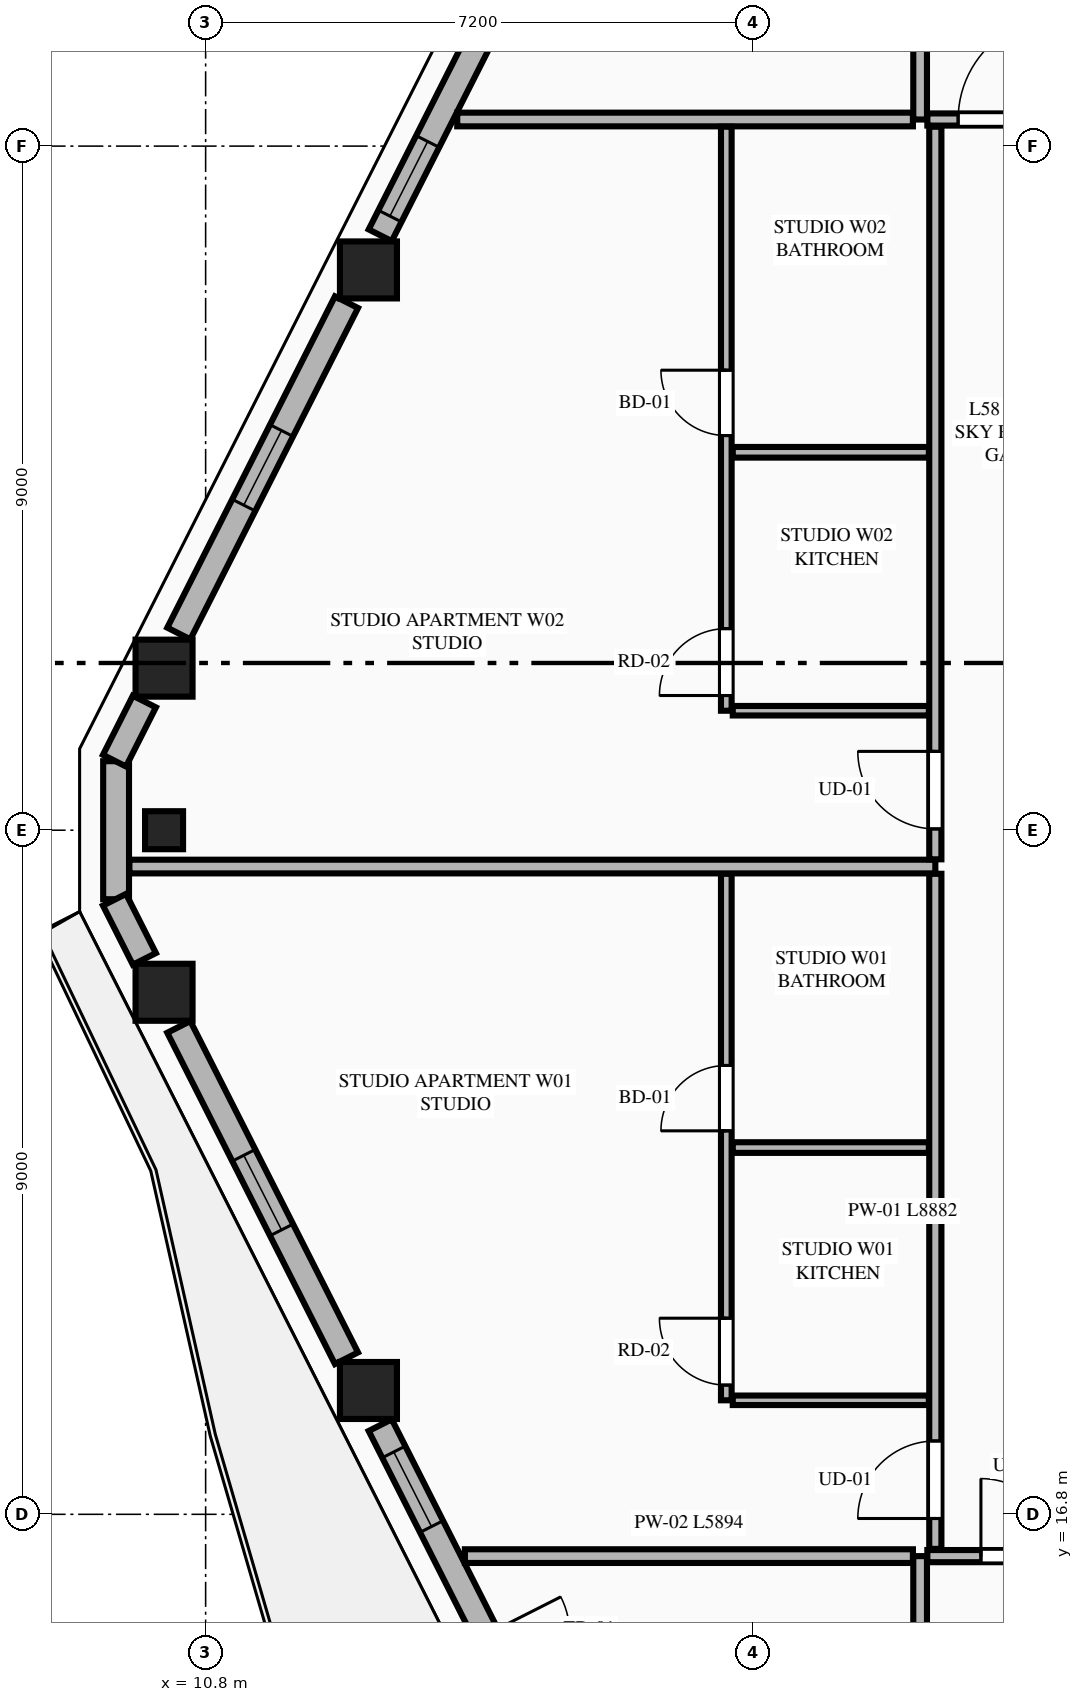
"""IFC4 building model, lengths in metres.
Left out: names, types, materials, properties, quantities, classifications, styles, units other than length and angle.
Written with IfcOpenShell. Run it as: python <this file> out.ifc"""

import sys

from ifc_helpers import new_model, si_unit, direction, frame, frame_2d, origin, origin_2d, place, context, subcontext, project, spatial, rectangle, extrude, element, fill, save


model = new_model("IFC4")
c1 = context("Model", 3, precision=1e-05, world=origin(), true_north=direction((0.0, 1.0)))
c2 = subcontext(c1, "Body", "Model", "MODEL_VIEW")
j1 = project(units=[si_unit("LENGTHUNIT", "METRE"), si_unit("PLANEANGLEUNIT", "RADIAN")], contexts=[c1])
p1 = place(None, origin())
s1 = spatial("IfcSite", under=j1, at=p1, CompositionType="ELEMENT")
p2 = place(p1, origin())
s2 = spatial("IfcBuilding", under=s1, at=p2, CompositionType="ELEMENT")
p3 = place(p2, frame((0.0, 0.0, 218.05)))
s3 = spatial("IfcBuildingStorey", under=s2, at=p3, CompositionType="ELEMENT", Elevation=218.05)
for number, where, z_axis, x_axis in (
    (1, (12.942, 33.171, 0.0), (0.0, 0.0, 1.0), (1.0, 0.0, 0.0)),
    (2, (10.253, 27.932, 0.0), (0.0, 0.0, 1.0), (1.0, 0.0, 0.0)),
    (3, (10.253, 23.668, 0.0), (0.0, 0.0, 1.0), (1.0, 0.0, 0.0)),
    (4, (12.942, 18.429, 0.0), (0.0, 0.0, 1.0), (1.0, 0.0, 0.0)),
):
    element("IfcColumn", number, at=place(p3, frame(where, z_axis=z_axis, x_axis=x_axis)), inside=s3, PredefinedType="COLUMN", context=c2, shape_type="SweptSolid", body=[
        extrude(rectangle(XDim=0.75, YDim=0.75, at=origin_2d()), origin(), (0.0, 0.0, 1.0), 3.55),
    ])
p4 = place(p3, frame((10.253, 25.8, 0.0), z_axis=(0.0, 0.0, 1.0), x_axis=(0.0, -1.0, 0.0)))
e5 = element("IfcColumn", 5, at=p4, inside=s3, PredefinedType="PILASTER", context=c2, shape_type="SweptSolid", body=[
    extrude(rectangle(XDim=0.5, YDim=0.35, at=origin_2d()), origin(), (0.0, 0.0, 1.0), 3.55),
])
p5 = place(p3, frame((9.622, 26.708, 0.0), z_axis=(0.0, 0.0, 1.0), x_axis=(0.0, -1.0, 0.0)))
e6 = element("IfcWall", 6, at=p5, inside=s3, PredefinedType="STANDARD", context=c2, shape_type="SweptSolid", body=[
    extrude(rectangle(XDim=1.816, YDim=0.34, at=frame_2d((0.908, 0.0))), origin(), (0.0, 0.0, 1.0), 3.27),
])
p6 = place(p3, frame((15.397, 38.173, 0.0), z_axis=(0.0, 0.0, 1.0), x_axis=(-0.451444616922, -0.892299141461, 0.0)))
e7 = element("IfcWall", 7, at=p6, inside=s3, PredefinedType="STANDARD", context=c2, shape_type="SweptSolid", body=[
    extrude(rectangle(XDim=5.095, YDim=0.34, at=frame_2d((2.547, 0.0))), origin(), (0.0, 0.0, 1.0), 2.803),
])
p7 = place(p6, frame((1.014, 0.0, 0.75)))
e8 = element("IfcOpeningElement", 8, at=p7, cuts=e7, PredefinedType="OPENING", context=c2, shape_type="SweptSolid", body=[
    extrude(rectangle(XDim=1.1, YDim=1.903, at=frame_2d((0.55, 0.952))), frame((0.0, 0.18, 0.0), z_axis=(0.0, -1.0, 0.0), x_axis=(1.0, 0.0, 0.0)), (0.0, 0.0, 1.0), 0.36),
])
p8 = place(p6, frame((3.712, 0.0, 0.75)))
e9 = element("IfcOpeningElement", 9, at=p8, cuts=e7, PredefinedType="OPENING", context=c2, shape_type="SweptSolid", body=[
    extrude(rectangle(XDim=1.1, YDim=1.903, at=frame_2d((0.55, 0.952))), frame((0.0, 0.18, 0.0), z_axis=(0.0, -1.0, 0.0), x_axis=(1.0, 0.0, 0.0)), (0.0, 0.0, 1.0), 0.36),
])
p9 = place(p3, frame((12.653, 32.747, 0.0), z_axis=(0.0, 0.0, 1.0), x_axis=(-0.451545895749, -0.892247893824, 0.0)))
e10 = element("IfcWall", 10, at=p9, inside=s3, PredefinedType="STANDARD", context=c2, shape_type="SweptSolid", body=[
    extrude(rectangle(XDim=4.885, YDim=0.34, at=frame_2d((2.443, 0.0))), origin(), (0.0, 0.0, 1.0), 2.803),
])
p10 = place(p9, frame((1.893, 0.0, 0.75)))
e11 = element("IfcOpeningElement", 11, at=p10, cuts=e10, PredefinedType="OPENING", context=c2, shape_type="SweptSolid", body=[
    extrude(rectangle(XDim=1.1, YDim=1.903, at=frame_2d((0.55, 0.952))), frame((0.0, 0.18, 0.0), z_axis=(0.0, -1.0, 0.0), x_axis=(1.0, 0.0, 0.0)), (0.0, 0.0, 1.0), 0.36),
])
p11 = place(p3, frame((9.994, 27.493, 0.0), z_axis=(0.0, 0.0, 1.0), x_axis=(-0.450796198004, -0.892626902947, 0.0)))
e12 = element("IfcWall", 12, at=p11, inside=s3, PredefinedType="STANDARD", context=c2, shape_type="SweptSolid", body=[
    extrude(rectangle(XDim=0.871, YDim=0.34, at=frame_2d((0.436, 0.0))), origin(), (0.0, 0.0, 1.0), 3.27),
])
p12 = place(p3, frame((9.601, 24.885, 0.0), z_axis=(0.0, 0.0, 1.0), x_axis=(0.450683483537, -0.892683817299, 0.0)))
e13 = element("IfcWall", 13, at=p12, inside=s3, PredefinedType="STANDARD", context=c2, shape_type="SweptSolid", body=[
    extrude(rectangle(XDim=0.872, YDim=0.34, at=frame_2d((0.436, 0.0))), origin(), (0.0, 0.0, 1.0), 3.27),
])
p13 = place(p3, frame((10.447, 23.212, 0.0), z_axis=(0.0, 0.0, 1.0), x_axis=(0.451566029745, -0.892237704191, 0.0)))
e14 = element("IfcWall", 14, at=p13, inside=s3, PredefinedType="STANDARD", context=c2, shape_type="SweptSolid", body=[
    extrude(rectangle(XDim=4.885, YDim=0.34, at=frame_2d((2.443, 0.0))), origin(), (0.0, 0.0, 1.0), 2.803),
])
p14 = place(p13, frame((1.893, 0.0, 0.75)))
e15 = element("IfcOpeningElement", 15, at=p14, cuts=e14, PredefinedType="OPENING", context=c2, shape_type="SweptSolid", body=[
    extrude(rectangle(XDim=1.1, YDim=1.903, at=frame_2d((0.55, 0.952))), frame((0.0, 0.18, 0.0), z_axis=(0.0, -1.0, 0.0), x_axis=(1.0, 0.0, 0.0)), (0.0, 0.0, 1.0), 0.36),
])
p15 = place(p3, frame((13.097, 17.973, 0.0), z_axis=(0.0, 0.0, 1.0), x_axis=(0.451463920536, -0.892289374841, 0.0)))
e16 = element("IfcWall", 16, at=p15, inside=s3, PredefinedType="STANDARD", context=c2, shape_type="SweptSolid", body=[
    extrude(rectangle(XDim=5.095, YDim=0.34, at=frame_2d((2.547, 0.0))), origin(), (0.0, 0.0, 1.0), 2.803),
])
p16 = place(p15, frame((3.088, 0.0, 0.0)))
e17 = element("IfcOpeningElement", 17, at=p16, cuts=e16, PredefinedType="OPENING", context=c2, shape_type="SweptSolid", body=[
    extrude(rectangle(XDim=1.1, YDim=2.25, at=frame_2d((0.55, 1.125))), frame((0.0, 0.18, 0.0), z_axis=(0.0, -1.0, 0.0), x_axis=(1.0, 0.0, 0.0)), (0.0, 0.0, 1.0), 0.36),
])
p17 = place(p15, frame((0.395, 0.0, 0.75)))
e18 = element("IfcOpeningElement", 18, at=p17, cuts=e16, PredefinedType="OPENING", context=c2, shape_type="SweptSolid", body=[
    extrude(rectangle(XDim=1.1, YDim=1.903, at=frame_2d((0.55, 0.952))), frame((0.0, 0.18, 0.0), z_axis=(0.0, -1.0, 0.0), x_axis=(1.0, 0.0, 0.0)), (0.0, 0.0, 1.0), 0.36),
])
p18 = place(p3, frame((20.2, 5.968, 0.0), z_axis=(0.0, 0.0, 1.0), x_axis=(0.0, 1.0, 0.0)))
e19 = element("IfcWall", 19, at=p18, inside=s3, PredefinedType="PARTITIONING", context=c2, shape_type="SweptSolid", body=[
    extrude(rectangle(XDim=10.282, YDim=0.18, at=frame_2d((5.141, 0.0))), origin(), (0.0, 0.0, 1.0), 3.27),
])
p19 = place(p3, frame((20.295, 16.25, 0.0), z_axis=(0.0, 0.0, 1.0), x_axis=(1.0, 0.0, 0.0)))
e20 = element("IfcWall", 20, at=p19, inside=s3, PredefinedType="PARTITIONING", context=c2, shape_type="SweptSolid", body=[
    extrude(rectangle(XDim=24.21, YDim=0.16, at=frame_2d((12.105, 0.0))), origin(), (0.0, 0.0, 1.0), 3.27),
])
p20 = place(p19, frame((0.705, 0.0, 0.0)))
e21 = element("IfcOpeningElement", 21, at=p20, cuts=e20, PredefinedType="OPENING", context=c2, shape_type="SweptSolid", body=[
    extrude(rectangle(XDim=1.02, YDim=2.25, at=frame_2d((0.51, 1.125))), frame((0.0, 0.09, 0.0), z_axis=(0.0, -1.0, 0.0), x_axis=(1.0, 0.0, 0.0)), (0.0, 0.0, 1.0), 0.18),
])
p21 = place(p3, frame((20.2, 35.15, 0.0), z_axis=(0.0, 0.0, 1.0), x_axis=(0.0, 1.0, 0.0)))
e22 = element("IfcWall", 22, at=p21, inside=s3, PredefinedType="PARTITIONING", context=c2, shape_type="SweptSolid", body=[
    extrude(rectangle(XDim=10.482, YDim=0.18, at=frame_2d((5.241, 0.0))), origin(), (0.0, 0.0, 1.0), 3.27),
])
p22 = place(p3, frame((20.295, 35.15, 0.0), z_axis=(0.0, 0.0, 1.0), x_axis=(1.0, 0.0, 0.0)))
e23 = element("IfcWall", 23, at=p22, inside=s3, PredefinedType="PARTITIONING", context=c2, shape_type="SweptSolid", body=[
    extrude(rectangle(XDim=24.21, YDim=0.16, at=frame_2d((12.105, 0.0))), origin(), (0.0, 0.0, 1.0), 3.27),
])
p23 = place(p22, frame((0.405, 0.0, 0.0)))
e24 = element("IfcOpeningElement", 24, at=p23, cuts=e23, PredefinedType="OPENING", context=c2, shape_type="SweptSolid", body=[
    extrude(rectangle(XDim=1.35, YDim=2.35, at=frame_2d((0.675, 1.175))), frame((0.0, 0.09, 0.0), z_axis=(0.0, -1.0, 0.0), x_axis=(1.0, 0.0, 0.0)), (0.0, 0.0, 1.0), 0.18),
])
p24 = place(p3, frame((14.211, 16.25, 0.0), z_axis=(0.0, 0.0, 1.0), x_axis=(1.0, 0.0, 0.0)))
e25 = element("IfcWall", 25, at=p24, inside=s3, PredefinedType="PARTITIONING", context=c2, shape_type="SweptSolid", body=[
    extrude(rectangle(XDim=5.894, YDim=0.18, at=frame_2d((2.947, 0.0))), origin(), (0.0, 0.0, 1.0), 3.27),
])
p25 = place(p3, frame((14.11, 35.15, 0.0), z_axis=(0.0, 0.0, 1.0), x_axis=(1.0, 0.0, 0.0)))
e26 = element("IfcWall", 26, at=p25, inside=s3, PredefinedType="PARTITIONING", context=c2, shape_type="SweptSolid", body=[
    extrude(rectangle(XDim=5.995, YDim=0.18, at=frame_2d((2.998, 0.0))), origin(), (0.0, 0.0, 1.0), 3.27),
])
p26 = place(p3, frame((20.4, 16.345, 0.0), z_axis=(0.0, 0.0, 1.0), x_axis=(0.0, 1.0, 0.0)))
e27 = element("IfcWall", 27, at=p26, inside=s3, PredefinedType="PARTITIONING", context=c2, shape_type="SweptSolid", body=[
    extrude(rectangle(XDim=8.882, YDim=0.16, at=frame_2d((4.441, 0.0))), origin(), (0.0, 0.0, 1.0), 3.27),
])
p27 = place(p26, frame((0.4, 0.0, 0.0)))
e28 = element("IfcOpeningElement", 28, at=p27, cuts=e27, PredefinedType="OPENING", context=c2, shape_type="SweptSolid", body=[
    extrude(rectangle(XDim=1.02, YDim=2.25, at=frame_2d((0.51, 1.125))), frame((0.0, 0.09, 0.0), z_axis=(0.0, -1.0, 0.0), x_axis=(1.0, 0.0, 0.0)), (0.0, 0.0, 1.0), 0.18),
])
p28 = place(p3, frame((17.735, 18.3, 0.0), z_axis=(0.0, 0.0, 1.0), x_axis=(1.0, 0.0, 0.0)))
e29 = element("IfcWall", 29, at=p28, inside=s3, PredefinedType="PARTITIONING", context=c2, shape_type="SweptSolid", body=[
    extrude(rectangle(XDim=2.58, YDim=0.125, at=frame_2d((1.29, 0.0))), origin(), (0.0, 0.0, 1.0), 2.727),
])
p29 = place(p3, frame((17.65, 18.3, 0.0), z_axis=(0.0, 0.0, 1.0), x_axis=(0.0, 1.0, 0.0)))
e30 = element("IfcWall", 30, at=p29, inside=s3, PredefinedType="PLUMBINGWALL", context=c2, shape_type="SweptSolid", body=[
    extrude(rectangle(XDim=6.927, YDim=0.14, at=frame_2d((3.463, 0.0))), origin(), (0.0, 0.0, 1.0), 3.27),
])
p30 = place(p29, frame((3.545, 0.0, 0.0)))
e31 = element("IfcOpeningElement", 31, at=p30, cuts=e30, PredefinedType="OPENING", context=c2, shape_type="SweptSolid", body=[
    extrude(rectangle(XDim=0.86, YDim=2.1, at=frame_2d((0.43, 1.05))), frame((0.0, 0.08, 0.0), z_axis=(0.0, -1.0, 0.0), x_axis=(1.0, 0.0, 0.0)), (0.0, 0.0, 1.0), 0.16),
])
p31 = place(p29, frame((0.2, 0.0, 0.0)))
e32 = element("IfcOpeningElement", 32, at=p31, cuts=e30, PredefinedType="OPENING", context=c2, shape_type="SweptSolid", body=[
    extrude(rectangle(XDim=0.88, YDim=2.15, at=frame_2d((0.44, 1.075))), frame((0.0, 0.08, 0.0), z_axis=(0.0, -1.0, 0.0), x_axis=(1.0, 0.0, 0.0)), (0.0, 0.0, 1.0), 0.16),
])
p32 = place(p3, frame((17.735, 21.625, 0.0), z_axis=(0.0, 0.0, 1.0), x_axis=(1.0, 0.0, 0.0)))
e33 = element("IfcWall", 33, at=p32, inside=s3, PredefinedType="PLUMBINGWALL", context=c2, shape_type="SweptSolid", body=[
    extrude(rectangle(XDim=2.58, YDim=0.14, at=frame_2d((1.29, 0.0))), origin(), (0.0, 0.0, 1.0), 3.27),
])
p33 = place(p3, frame((9.797, 25.322, 0.0), z_axis=(0.0, 0.0, 1.0), x_axis=(1.0, 0.0, 0.0)))
e34 = element("IfcWall", 34, at=p33, inside=s3, PredefinedType="PARTITIONING", context=c2, shape_type="SweptSolid", body=[
    extrude(rectangle(XDim=10.603, YDim=0.18, at=frame_2d((5.301, 0.0))), origin(), (0.0, 0.0, 1.0), 3.27),
])
p34 = place(p3, frame((20.4, 25.417, 0.0), z_axis=(0.0, 0.0, 1.0), x_axis=(0.0, 1.0, 0.0)))
e35 = element("IfcWall", 35, at=p34, inside=s3, PredefinedType="PARTITIONING", context=c2, shape_type="SweptSolid", body=[
    extrude(rectangle(XDim=9.638, YDim=0.16, at=frame_2d((4.819, 0.0))), origin(), (0.0, 0.0, 1.0), 3.27),
])
p35 = place(p34, frame((0.4, 0.0, 0.0)))
e36 = element("IfcOpeningElement", 36, at=p35, cuts=e35, PredefinedType="OPENING", context=c2, shape_type="SweptSolid", body=[
    extrude(rectangle(XDim=1.02, YDim=2.25, at=frame_2d((0.51, 1.125))), frame((0.0, 0.09, 0.0), z_axis=(0.0, -1.0, 0.0), x_axis=(1.0, 0.0, 0.0)), (0.0, 0.0, 1.0), 0.18),
])
p36 = place(p3, frame((17.735, 27.372, 0.0), z_axis=(0.0, 0.0, 1.0), x_axis=(1.0, 0.0, 0.0)))
e37 = element("IfcWall", 37, at=p36, inside=s3, PredefinedType="PARTITIONING", context=c2, shape_type="SweptSolid", body=[
    extrude(rectangle(XDim=2.58, YDim=0.125, at=frame_2d((1.29, 0.0))), origin(), (0.0, 0.0, 1.0), 3.27),
])
p37 = place(p3, frame((17.65, 27.372, 0.0), z_axis=(0.0, 0.0, 1.0), x_axis=(0.0, 1.0, 0.0)))
e38 = element("IfcWall", 38, at=p37, inside=s3, PredefinedType="PLUMBINGWALL", context=c2, shape_type="SweptSolid", body=[
    extrude(rectangle(XDim=7.683, YDim=0.14, at=frame_2d((3.841, 0.0))), origin(), (0.0, 0.0, 1.0), 3.27),
])
p38 = place(p37, frame((3.62, 0.0, 0.0)))
e39 = element("IfcOpeningElement", 39, at=p38, cuts=e38, PredefinedType="OPENING", context=c2, shape_type="SweptSolid", body=[
    extrude(rectangle(XDim=0.86, YDim=2.1, at=frame_2d((0.43, 1.05))), frame((0.0, 0.08, 0.0), z_axis=(0.0, -1.0, 0.0), x_axis=(1.0, 0.0, 0.0)), (0.0, 0.0, 1.0), 0.16),
])
p39 = place(p37, frame((0.2, 0.0, 0.0)))
e40 = element("IfcOpeningElement", 40, at=p39, cuts=e38, PredefinedType="OPENING", context=c2, shape_type="SweptSolid", body=[
    extrude(rectangle(XDim=0.88, YDim=2.15, at=frame_2d((0.44, 1.075))), frame((0.0, 0.08, 0.0), z_axis=(0.0, -1.0, 0.0), x_axis=(1.0, 0.0, 0.0)), (0.0, 0.0, 1.0), 0.16),
])
p40 = place(p3, frame((17.735, 30.772, 0.0), z_axis=(0.0, 0.0, 1.0), x_axis=(1.0, 0.0, 0.0)))
e41 = element("IfcWall", 41, at=p40, inside=s3, PredefinedType="PLUMBINGWALL", context=c2, shape_type="SweptSolid", body=[
    extrude(rectangle(XDim=2.58, YDim=0.14, at=frame_2d((1.29, 0.0))), origin(), (0.0, 0.0, 1.0), 3.27),
])
p41 = place(p10, origin())
e42 = element("IfcWindow", 42, at=p41, inside=s3, PartitioningType="SINGLE_PANEL", PredefinedType="WINDOW", context=c2, shape_type="SweptSolid", body=[
    extrude(rectangle(XDim=1.1, YDim=1.903, at=frame_2d((0.55, 0.952))), frame((0.0, 0.03, 0.0), z_axis=(0.0, -1.0, 0.0), x_axis=(1.0, 0.0, 0.0)), (0.0, 0.0, 1.0), 0.06),
])
fill(e11, e42)
p42 = place(p14, origin())
e43 = element("IfcWindow", 43, at=p42, inside=s3, PartitioningType="SINGLE_PANEL", PredefinedType="WINDOW", context=c2, shape_type="SweptSolid", body=[
    extrude(rectangle(XDim=1.1, YDim=1.903, at=frame_2d((0.55, 0.952))), frame((0.0, 0.03, 0.0), z_axis=(0.0, -1.0, 0.0), x_axis=(1.0, 0.0, 0.0)), (0.0, 0.0, 1.0), 0.06),
])
fill(e15, e43)
p43 = place(p20, origin())
e44 = element("IfcDoor", 44, at=p43, inside=s3, OperationType="SINGLE_SWING_LEFT", PredefinedType="DOOR", context=c2, shape_type="SweptSolid", body=[
    extrude(rectangle(XDim=1.02, YDim=2.25, at=frame_2d((0.51, 1.125))), frame((0.0, 0.025, 0.0), z_axis=(0.0, -1.0, 0.0), x_axis=(1.0, 0.0, 0.0)), (0.0, 0.0, 1.0), 0.05),
])
fill(e21, e44)
p44 = place(p23, origin())
e45 = element("IfcDoor", 45, at=p44, inside=s3, OperationType="SINGLE_SWING_RIGHT", PredefinedType="DOOR", context=c2, shape_type="SweptSolid", body=[
    extrude(rectangle(XDim=1.35, YDim=2.35, at=frame_2d((0.675, 1.175))), frame((0.0, 0.025, 0.0), z_axis=(0.0, -1.0, 0.0), x_axis=(1.0, 0.0, 0.0)), (0.0, 0.0, 1.0), 0.05),
])
fill(e24, e45)
p45 = place(p30, origin())
e46 = element("IfcDoor", 46, at=p45, inside=s3, OperationType="SINGLE_SWING_LEFT", PredefinedType="DOOR", context=c2, shape_type="SweptSolid", body=[
    extrude(rectangle(XDim=0.86, YDim=2.1, at=frame_2d((0.43, 1.05))), frame((0.0, 0.025, 0.0), z_axis=(0.0, -1.0, 0.0), x_axis=(1.0, 0.0, 0.0)), (0.0, 0.0, 1.0), 0.05),
])
fill(e31, e46)
p46 = place(p27, origin())
e47 = element("IfcDoor", 47, at=p46, inside=s3, OperationType="SINGLE_SWING_LEFT", PredefinedType="DOOR", context=c2, shape_type="SweptSolid", body=[
    extrude(rectangle(XDim=1.02, YDim=2.25, at=frame_2d((0.51, 1.125))), frame((0.0, 0.025, 0.0), z_axis=(0.0, -1.0, 0.0), x_axis=(1.0, 0.0, 0.0)), (0.0, 0.0, 1.0), 0.05),
])
fill(e28, e47)
p47 = place(p31, origin())
e48 = element("IfcDoor", 48, at=p47, inside=s3, OperationType="SINGLE_SWING_RIGHT", PredefinedType="DOOR", context=c2, shape_type="SweptSolid", body=[
    extrude(rectangle(XDim=0.88, YDim=2.15, at=frame_2d((0.44, 1.075))), frame((0.0, 0.025, 0.0), z_axis=(0.0, -1.0, 0.0), x_axis=(1.0, 0.0, 0.0)), (0.0, 0.0, 1.0), 0.05),
])
fill(e32, e48)
p48 = place(p38, origin())
e49 = element("IfcDoor", 49, at=p48, inside=s3, OperationType="SINGLE_SWING_RIGHT", PredefinedType="DOOR", context=c2, shape_type="SweptSolid", body=[
    extrude(rectangle(XDim=0.86, YDim=2.1, at=frame_2d((0.43, 1.05))), frame((0.0, 0.025, 0.0), z_axis=(0.0, -1.0, 0.0), x_axis=(1.0, 0.0, 0.0)), (0.0, 0.0, 1.0), 0.05),
])
fill(e39, e49)
p49 = place(p35, origin())
e50 = element("IfcDoor", 50, at=p49, inside=s3, OperationType="SINGLE_SWING_RIGHT", PredefinedType="DOOR", context=c2, shape_type="SweptSolid", body=[
    extrude(rectangle(XDim=1.02, YDim=2.25, at=frame_2d((0.51, 1.125))), frame((0.0, 0.025, 0.0), z_axis=(0.0, -1.0, 0.0), x_axis=(1.0, 0.0, 0.0)), (0.0, 0.0, 1.0), 0.05),
])
fill(e36, e50)
p50 = place(p39, origin())
e51 = element("IfcDoor", 51, at=p50, inside=s3, OperationType="SINGLE_SWING_LEFT", PredefinedType="DOOR", context=c2, shape_type="SweptSolid", body=[
    extrude(rectangle(XDim=0.88, YDim=2.15, at=frame_2d((0.44, 1.075))), frame((0.0, 0.025, 0.0), z_axis=(0.0, -1.0, 0.0), x_axis=(1.0, 0.0, 0.0)), (0.0, 0.0, 1.0), 0.05),
])
fill(e40, e51)
p51 = place(p8, origin())
e52 = element("IfcWindow", 52, at=p51, inside=s3, PartitioningType="SINGLE_PANEL", PredefinedType="WINDOW", context=c2, shape_type="SweptSolid", body=[
    extrude(rectangle(XDim=1.1, YDim=1.903, at=frame_2d((0.55, 0.952))), frame((0.0, 0.03, 0.0), z_axis=(0.0, -1.0, 0.0), x_axis=(1.0, 0.0, 0.0)), (0.0, 0.0, 1.0), 0.06),
])
fill(e9, e52)
p52 = place(p17, origin())
e53 = element("IfcWindow", 53, at=p52, inside=s3, PartitioningType="SINGLE_PANEL", PredefinedType="WINDOW", context=c2, shape_type="SweptSolid", body=[
    extrude(rectangle(XDim=1.1, YDim=1.903, at=frame_2d((0.55, 0.952))), frame((0.0, 0.03, 0.0), z_axis=(0.0, -1.0, 0.0), x_axis=(1.0, 0.0, 0.0)), (0.0, 0.0, 1.0), 0.06),
])
fill(e18, e53)
save(model, sys.argv[1])
